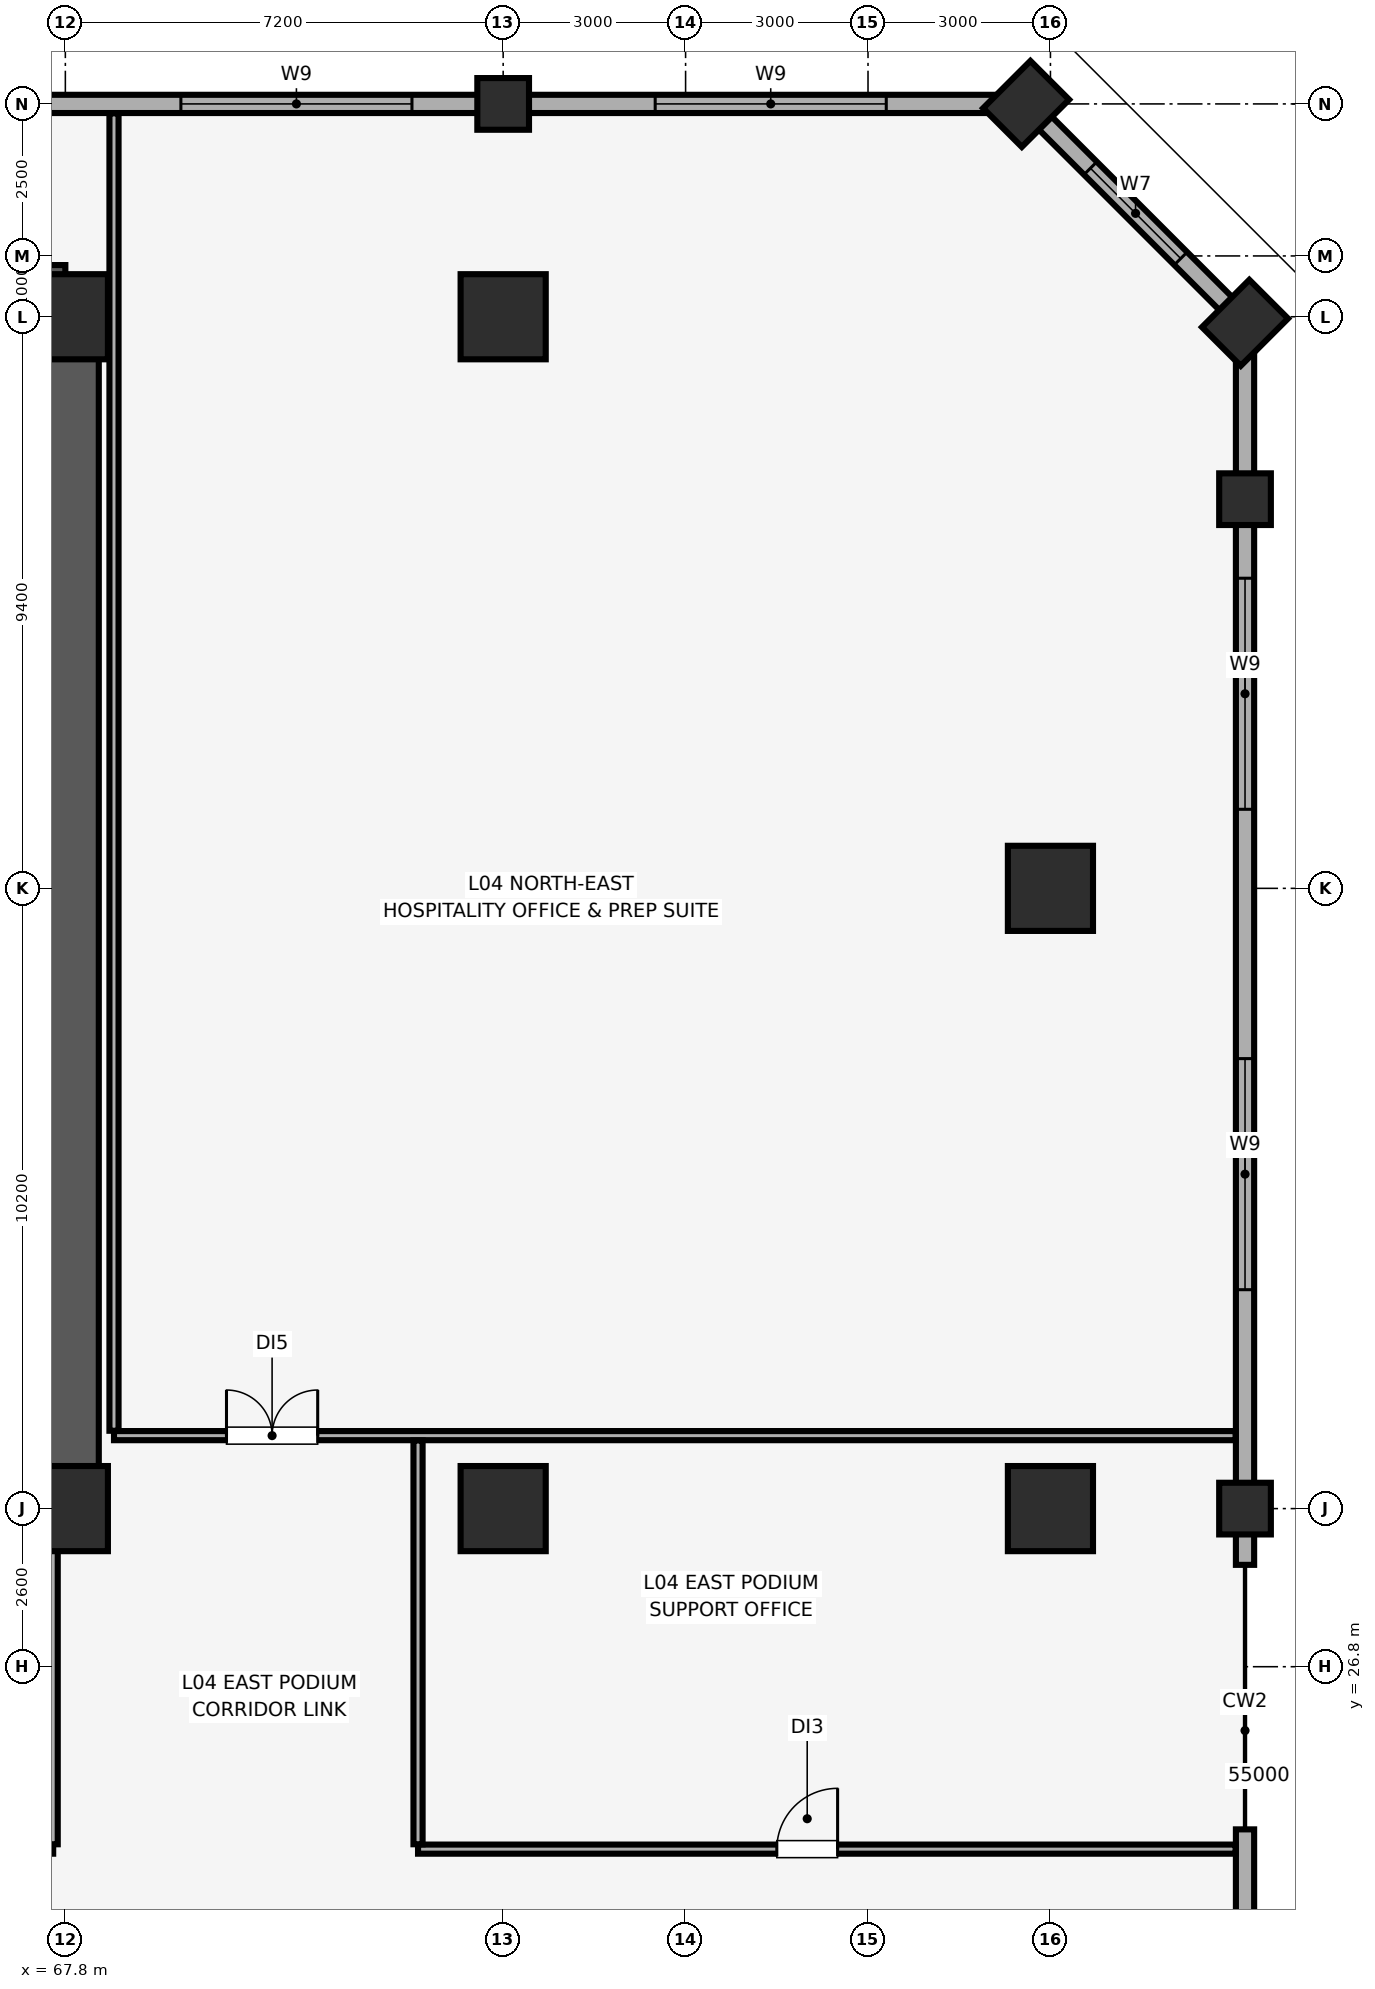
"""IFC4 building model, lengths in metres.
Left out: names, types, materials, properties, quantities, classifications, styles, units other than length and angle.
Written with IfcOpenShell. Run it as: python <this file> out.ifc"""

import sys

from ifc_helpers import new_model, si_unit, direction, frame, frame_2d, origin, origin_2d, place, context, subcontext, project, spatial, rectangle, extrude, element, fill, save


model = new_model("IFC4")
c1 = context("Model", 3, precision=1e-05, world=origin(), true_north=direction((0.0, 1.0)))
c2 = subcontext(c1, "Body", "Model", "MODEL_VIEW")
j1 = project(units=[si_unit("LENGTHUNIT", "METRE"), si_unit("PLANEANGLEUNIT", "RADIAN")], contexts=[c1])
p1 = place(None, origin())
s1 = spatial("IfcSite", under=j1, at=p1, CompositionType="ELEMENT")
p2 = place(p1, origin())
s2 = spatial("IfcBuilding", under=s1, at=p2, CompositionType="ELEMENT")
p3 = place(p2, frame((0.0, 0.0, 26.0)))
s3 = spatial("IfcBuildingStorey", under=s2, at=p3, CompositionType="ELEMENT", Elevation=26.0)
for number, where, z_axis, x_axis in (
    (1, (75.0, 52.5, 0.0), (0.0, 0.0, 1.0), (1.0, 0.0, 0.0)),
    (2, (87.2, 29.4, 0.0), (0.0, 0.0, 1.0), (1.0, 0.0, 0.0)),
    (3, (87.2, 46.0, 0.0), (0.0, 0.0, 1.0), (1.0, 0.0, 0.0)),
):
    element("IfcColumn", number, at=place(p3, frame(where, z_axis=z_axis, x_axis=x_axis)), inside=s3, PredefinedType="COLUMN", context=c2, shape_type="SweptSolid", body=[
        extrude(rectangle(XDim=0.85, YDim=0.85, at=origin_2d()), origin(), (0.0, 0.0, 1.0), 5.16),
    ])
for number, where, z_axis, x_axis in (
    (4, (87.2, 48.9, 0.0), (0.0, 0.0, 1.0), (0.707, 0.707, 0.0)),
    (5, (83.6, 52.5, 0.0), (0.0, 0.0, 1.0), (0.707, 0.707, 0.0)),
):
    element("IfcColumn", number, at=place(p3, frame(where, z_axis=z_axis, x_axis=x_axis)), inside=s3, PredefinedType="PILASTER", context=c2, shape_type="SweptSolid", body=[
        extrude(rectangle(XDim=1.1, YDim=0.9, at=origin_2d()), origin(), (0.0, 0.0, 1.0), 5.16),
    ])
for number, where, z_axis, x_axis in (
    (6, (67.8, 29.4, 0.0), (0.0, 0.0, 1.0), (1.0, 0.0, 0.0)),
    (7, (67.8, 49.0, 0.0), (0.0, 0.0, 1.0), (1.0, 0.0, 0.0)),
    (8, (75.0, 29.4, 0.0), (0.0, 0.0, 1.0), (1.0, 0.0, 0.0)),
    (9, (75.0, 49.0, 0.0), (0.0, 0.0, 1.0), (1.0, 0.0, 0.0)),
    (10, (84.0, 29.4, 0.0), (0.0, 0.0, 1.0), (1.0, 0.0, 0.0)),
    (11, (84.0, 39.6, 0.0), (0.0, 0.0, 1.0), (1.0, 0.0, 0.0)),
):
    element("IfcColumn", number, at=place(p3, frame(where, z_axis=z_axis, x_axis=x_axis)), inside=s3, PredefinedType="COLUMN", context=c2, shape_type="SweptSolid", body=[
        extrude(rectangle(XDim=1.4, YDim=1.4, at=origin_2d()), origin(), (0.0, 0.0, 1.0), 5.16),
    ])
p4 = place(p3, frame((87.2, 21.075, 0.0), z_axis=(0.0, 0.0, 1.0), x_axis=(0.0, 1.0, 0.0)))
e12 = element("IfcWall", 12, at=p4, inside=s3, PredefinedType="SOLIDWALL", context=c2, shape_type="SweptSolid", body=[
    extrude(rectangle(XDim=3.05, YDim=0.3, at=frame_2d((1.525, 0.0))), origin(), (0.0, 0.0, 1.0), 5.12),
])
p5 = place(p3, frame((87.2, 28.475, 0.0), z_axis=(0.0, 0.0, 1.0), x_axis=(0.0, 1.0, 0.0)))
e13 = element("IfcWall", 13, at=p5, inside=s3, PredefinedType="SOLIDWALL", context=c2, shape_type="SweptSolid", body=[
    extrude(rectangle(XDim=20.425, YDim=0.3, at=frame_2d((10.212, 0.0))), origin(), (0.0, 0.0, 1.0), 5.12),
])
p6 = place(p5, frame((4.525, 0.0, 0.85)))
e14 = element("IfcOpeningElement", 14, at=p6, cuts=e13, PredefinedType="OPENING", context=c2, shape_type="SweptSolid", body=[
    extrude(rectangle(XDim=3.8, YDim=2.2, at=frame_2d((1.9, 1.1))), frame((0.0, 0.16, 0.0), z_axis=(0.0, -1.0, 0.0), x_axis=(1.0, 0.0, 0.0)), (0.0, 0.0, 1.0), 0.32),
])
p7 = place(p5, frame((12.425, 0.0, 0.85)))
e15 = element("IfcOpeningElement", 15, at=p7, cuts=e13, PredefinedType="OPENING", context=c2, shape_type="SweptSolid", body=[
    extrude(rectangle(XDim=3.8, YDim=2.2, at=frame_2d((1.9, 1.1))), frame((0.0, 0.16, 0.0), z_axis=(0.0, -1.0, 0.0), x_axis=(1.0, 0.0, 0.0)), (0.0, 0.0, 1.0), 0.32),
])
p8 = place(p3, frame((87.2, 48.9, 0.0), z_axis=(0.0, 0.0, 1.0), x_axis=(-0.707082803744, 0.707130757816, 0.0)))
e16 = element("IfcWall", 16, at=p8, inside=s3, PredefinedType="SOLIDWALL", context=c2, shape_type="SweptSolid", body=[
    extrude(rectangle(XDim=5.091, YDim=0.3, at=frame_2d((2.545, 0.0))), origin(), (0.0, 0.0, 1.0), 5.12),
])
p9 = place(p8, frame((1.496, 0.0, 0.85)))
e17 = element("IfcOpeningElement", 17, at=p9, cuts=e16, PredefinedType="OPENING", context=c2, shape_type="SweptSolid", body=[
    extrude(rectangle(XDim=2.1, YDim=1.6, at=frame_2d((1.05, 0.8))), frame((0.0, 0.16, 0.0), z_axis=(0.0, -1.0, 0.0), x_axis=(1.0, 0.0, 0.0)), (0.0, 0.0, 1.0), 0.32),
])
p10 = place(p3, frame((83.6, 52.5, 0.0), z_axis=(0.0, 0.0, 1.0), x_axis=(-1.0, 0.0, 0.0)))
e18 = element("IfcWall", 18, at=p10, inside=s3, PredefinedType="SOLIDWALL", context=c2, shape_type="SweptSolid", body=[
    extrude(rectangle(XDim=83.2, YDim=0.3, at=frame_2d((41.6, 0.0))), origin(), (0.0, 0.0, 1.0), 5.12),
])
p11 = place(p10, frame((77.1, 0.0, 0.85)))
e19 = element("IfcOpeningElement", 19, at=p11, cuts=e18, PredefinedType="OPENING", context=c2, shape_type="SweptSolid", body=[
    extrude(rectangle(XDim=3.8, YDim=2.2, at=frame_2d((1.9, 1.1))), frame((0.0, 0.16, 0.0), z_axis=(0.0, -1.0, 0.0), x_axis=(1.0, 0.0, 0.0)), (0.0, 0.0, 1.0), 0.32),
])
p12 = place(p10, frame((69.15, 0.0, 0.85)))
e20 = element("IfcOpeningElement", 20, at=p12, cuts=e18, PredefinedType="OPENING", context=c2, shape_type="SweptSolid", body=[
    extrude(rectangle(XDim=3.8, YDim=2.2, at=frame_2d((1.9, 1.1))), frame((0.0, 0.16, 0.0), z_axis=(0.0, -1.0, 0.0), x_axis=(1.0, 0.0, 0.0)), (0.0, 0.0, 1.0), 0.32),
])
p13 = place(p10, frame((10.1, 0.0, 0.85)))
e21 = element("IfcOpeningElement", 21, at=p13, cuts=e18, PredefinedType="OPENING", context=c2, shape_type="SweptSolid", body=[
    extrude(rectangle(XDim=3.8, YDim=2.2, at=frame_2d((1.9, 1.1))), frame((0.0, 0.16, 0.0), z_axis=(0.0, -1.0, 0.0), x_axis=(1.0, 0.0, 0.0)), (0.0, 0.0, 1.0), 0.32),
])
p14 = place(p10, frame((2.3, 0.0, 0.85)))
e22 = element("IfcOpeningElement", 22, at=p14, cuts=e18, PredefinedType="OPENING", context=c2, shape_type="SweptSolid", body=[
    extrude(rectangle(XDim=3.8, YDim=2.2, at=frame_2d((1.9, 1.1))), frame((0.0, 0.16, 0.0), z_axis=(0.0, -1.0, 0.0), x_axis=(1.0, 0.0, 0.0)), (0.0, 0.0, 1.0), 0.32),
])
p15 = place(p3, frame((16.2, 49.3, 0.0), z_axis=(0.0, 0.0, 1.0), x_axis=(1.0, 0.0, 0.0)))
e23 = element("IfcWall", 23, at=p15, inside=s3, PredefinedType="SHEAR", context=c2, shape_type="SweptSolid", body=[
    extrude(rectangle(XDim=51.6, YDim=1.1, at=frame_2d((25.8, 0.0))), origin(), (0.0, 0.0, 1.0), 5.12),
])
p16 = place(p3, frame((67.8, 29.4, 0.0), z_axis=(0.0, 0.0, 1.0), x_axis=(0.0, 1.0, 0.0)))
e24 = element("IfcWall", 24, at=p16, inside=s3, PredefinedType="SHEAR", context=c2, shape_type="SweptSolid", body=[
    extrude(rectangle(XDim=19.2, YDim=1.1, at=frame_2d((9.6, 0.0))), origin(), (0.0, 0.0, 1.0), 5.12),
])
p17 = place(p3, frame((68.6, 30.6, 0.0), z_axis=(0.0, 0.0, 1.0), x_axis=(1.0, 0.0, 0.0)))
e25 = element("IfcWall", 25, at=p17, inside=s3, PredefinedType="PARTITIONING", context=c2, shape_type="SweptSolid", body=[
    extrude(rectangle(XDim=18.445, YDim=0.15, at=frame_2d((9.222, 0.0))), origin(), (0.0, 0.0, 1.0), 5.12),
])
p18 = place(p17, frame((1.85, 0.0, 0.0)))
e26 = element("IfcOpeningElement", 26, at=p18, cuts=e25, PredefinedType="OPENING", context=c2, shape_type="SweptSolid", body=[
    extrude(rectangle(XDim=1.5, YDim=2.25, at=frame_2d((0.75, 1.125))), frame((0.0, 0.085, 0.0), z_axis=(0.0, -1.0, 0.0), x_axis=(1.0, 0.0, 0.0)), (0.0, 0.0, 1.0), 0.17),
])
p19 = place(p3, frame((68.6, 30.68, 0.0), z_axis=(0.0, 0.0, 1.0), x_axis=(0.0, 1.0, 0.0)))
e27 = element("IfcWall", 27, at=p19, inside=s3, PredefinedType="PARTITIONING", context=c2, shape_type="SweptSolid", body=[
    extrude(rectangle(XDim=21.665, YDim=0.15, at=frame_2d((10.833, 0.0))), origin(), (0.0, 0.0, 1.0), 5.12),
])
p20 = place(p3, frame((73.6, 23.8, 0.0), z_axis=(0.0, 0.0, 1.0), x_axis=(1.0, 0.0, 0.0)))
e28 = element("IfcWall", 28, at=p20, inside=s3, PredefinedType="PARTITIONING", context=c2, shape_type="SweptSolid", body=[
    extrude(rectangle(XDim=13.445, YDim=0.15, at=frame_2d((6.722, 0.0))), origin(), (0.0, 0.0, 1.0), 5.12),
])
p21 = place(p20, frame((5.9, 0.0, 0.0)))
e29 = element("IfcOpeningElement", 29, at=p21, cuts=e28, PredefinedType="OPENING", context=c2, shape_type="SweptSolid", body=[
    extrude(rectangle(XDim=1.0, YDim=2.15, at=frame_2d((0.5, 1.075))), frame((0.0, 0.085, 0.0), z_axis=(0.0, -1.0, 0.0), x_axis=(1.0, 0.0, 0.0)), (0.0, 0.0, 1.0), 0.17),
])
p22 = place(p3, frame((73.6, 23.88, 0.0), z_axis=(0.0, 0.0, 1.0), x_axis=(0.0, 1.0, 0.0)))
e30 = element("IfcWall", 30, at=p22, inside=s3, PredefinedType="PARTITIONING", context=c2, shape_type="SweptSolid", body=[
    extrude(rectangle(XDim=6.64, YDim=0.15, at=frame_2d((3.32, 0.0))), origin(), (0.0, 0.0, 1.0), 5.12),
])
p23 = place(p3, frame((67.6, 23.88, 0.0), z_axis=(0.0, 0.0, 1.0), x_axis=(0.0, 1.0, 0.0)))
e31 = element("IfcWall", 31, at=p23, inside=s3, PredefinedType="PARTITIONING", context=c2, shape_type="SweptSolid", body=[
    extrude(rectangle(XDim=5.51, YDim=0.15, at=frame_2d((2.755, 0.0))), origin(), (0.0, 0.0, 1.0), 4.627),
])
p24 = place(p9, origin())
e32 = element("IfcWindow", 32, at=p24, inside=s3, PartitioningType="SINGLE_PANEL", PredefinedType="WINDOW", context=c2, shape_type="SweptSolid", body=[
    extrude(rectangle(XDim=2.1, YDim=1.6, at=frame_2d((1.05, 0.8))), frame((0.0, 0.03, 0.0), z_axis=(0.0, -1.0, 0.0), x_axis=(1.0, 0.0, 0.0)), (0.0, 0.0, 1.0), 0.06),
])
fill(e17, e32)
p25 = place(p6, origin())
e33 = element("IfcWindow", 33, at=p25, inside=s3, PartitioningType="SINGLE_PANEL", PredefinedType="WINDOW", context=c2, shape_type="SweptSolid", body=[
    extrude(rectangle(XDim=3.8, YDim=2.2, at=frame_2d((1.9, 1.1))), frame((0.0, 0.03, 0.0), z_axis=(0.0, -1.0, 0.0), x_axis=(1.0, 0.0, 0.0)), (0.0, 0.0, 1.0), 0.06),
])
fill(e14, e33)
p26 = place(p7, origin())
e34 = element("IfcWindow", 34, at=p26, inside=s3, PartitioningType="SINGLE_PANEL", PredefinedType="WINDOW", context=c2, shape_type="SweptSolid", body=[
    extrude(rectangle(XDim=3.8, YDim=2.2, at=frame_2d((1.9, 1.1))), frame((0.0, 0.03, 0.0), z_axis=(0.0, -1.0, 0.0), x_axis=(1.0, 0.0, 0.0)), (0.0, 0.0, 1.0), 0.06),
])
fill(e15, e34)
p27 = place(p13, origin())
e35 = element("IfcWindow", 35, at=p27, inside=s3, PartitioningType="SINGLE_PANEL", PredefinedType="WINDOW", context=c2, shape_type="SweptSolid", body=[
    extrude(rectangle(XDim=3.8, YDim=2.2, at=frame_2d((1.9, 1.1))), frame((0.0, 0.03, 0.0), z_axis=(0.0, -1.0, 0.0), x_axis=(1.0, 0.0, 0.0)), (0.0, 0.0, 1.0), 0.06),
])
fill(e21, e35)
p28 = place(p14, origin())
e36 = element("IfcWindow", 36, at=p28, inside=s3, PartitioningType="SINGLE_PANEL", PredefinedType="WINDOW", context=c2, shape_type="SweptSolid", body=[
    extrude(rectangle(XDim=3.8, YDim=2.2, at=frame_2d((1.9, 1.1))), frame((0.0, 0.03, 0.0), z_axis=(0.0, -1.0, 0.0), x_axis=(1.0, 0.0, 0.0)), (0.0, 0.0, 1.0), 0.06),
])
fill(e22, e36)
p29 = place(p18, origin())
e37 = element("IfcDoor", 37, at=p29, inside=s3, OperationType="DOUBLE_DOOR_SINGLE_SWING", PredefinedType="DOOR", context=c2, shape_type="SweptSolid", body=[
    extrude(rectangle(XDim=1.5, YDim=2.25, at=frame_2d((0.75, 1.125))), frame((0.0, 0.025, 0.0), z_axis=(0.0, -1.0, 0.0), x_axis=(1.0, 0.0, 0.0)), (0.0, 0.0, 1.0), 0.05),
])
fill(e26, e37)
p30 = place(p21, origin())
e38 = element("IfcDoor", 38, at=p30, inside=s3, OperationType="SINGLE_SWING_RIGHT", PredefinedType="DOOR", context=c2, shape_type="SweptSolid", body=[
    extrude(rectangle(XDim=1.0, YDim=2.15, at=frame_2d((0.5, 1.075))), frame((0.0, 0.025, 0.0), z_axis=(0.0, -1.0, 0.0), x_axis=(1.0, 0.0, 0.0)), (0.0, 0.0, 1.0), 0.05),
])
fill(e29, e38)
save(model, sys.argv[1])
